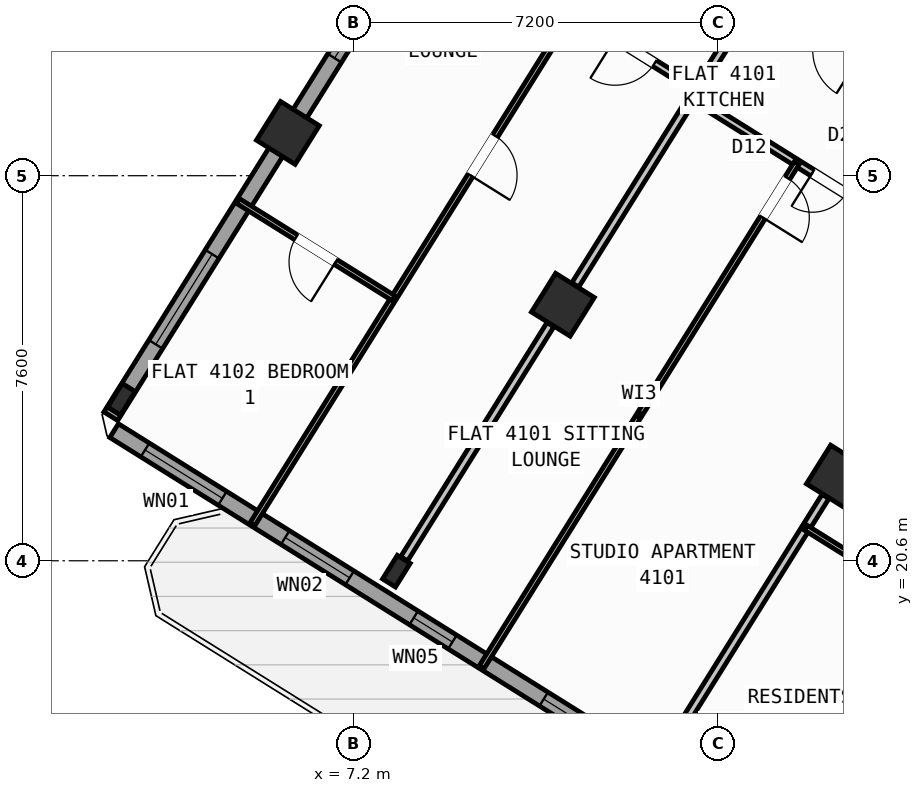
"""IFC4 building model, lengths in metres.
Left out: names, types, materials, properties, quantities, classifications, styles, units other than length and angle.
Written with IfcOpenShell. Run it as: python <this file> out.ifc"""

import sys

from ifc_helpers import new_model, si_unit, direction, frame, frame_2d, origin, origin_2d, place, context, subcontext, project, spatial, rectangle, hollow_rectangle, i_section, extrude, source, transform, mapped, element, fill, save


model = new_model("IFC4")
c1 = context("Model", 3, precision=1e-05, world=origin(), true_north=direction((0.0, 1.0)))
c2 = subcontext(c1, "Body", "Model", "MODEL_VIEW")
j1 = project(units=[si_unit("LENGTHUNIT", "METRE"), si_unit("PLANEANGLEUNIT", "RADIAN")], contexts=[c1])
p1 = place(None, origin())
s1 = spatial("IfcSite", under=j1, at=p1, CompositionType="ELEMENT")
p2 = place(p1, origin())
s2 = spatial("IfcBuilding", under=s1, at=p2, CompositionType="ELEMENT")
p3 = place(p2, frame((0.0, 0.0, 162.3)))
s3 = spatial("IfcBuildingStorey", under=s2, at=p3, CompositionType="ELEMENT", Elevation=162.3)
m1 = source(origin(), c2, "Body", "SweptSolid", [
    extrude(hollow_rectangle(XDim=0.9, YDim=0.9, WallThickness=0.036, at=origin_2d()), origin(), (0.0, 0.0, 1.0), 3.6),
])
for number, where, z_axis, x_axis in (
    (1, (16.764, 22.261, 0.0), (0.0, 0.0, 1.0), (-0.848, 0.53, 0.0)),
    (2, (11.336, 25.653, 0.0), (0.0, 0.0, 1.0), (-0.848, 0.53, 0.0)),
):
    element("IfcColumn", number, at=place(p3, frame(where, z_axis=z_axis, x_axis=x_axis)), inside=s3, PredefinedType="COLUMN", context=c2, shape_type="MappedRepresentation", body=[
        mapped(m1, transform((0.0, 0.0, 0.0), scale=1.0)),
    ])
m2 = source(origin(), c2, "Body", "SweptSolid", [
    extrude(i_section(OverallWidth=0.3, OverallDepth=0.55, WebThickness=0.015, FlangeThickness=0.029, at=origin_2d()), origin(), (0.0, 0.0, 1.0), 3.6),
])
p4 = place(p3, frame((8.051, 20.395, 0.0), z_axis=(0.0, 0.0, 1.0), x_axis=(-0.848048096156, 0.529919264233, 0.0)))
e3 = element("IfcColumn", 3, at=p4, inside=s3, PredefinedType="COLUMN", context=c2, shape_type="MappedRepresentation", body=[
    mapped(m2, transform((0.0, 0.0, 0.0), scale=1.0)),
])
p5 = place(p3, frame((5.909, 29.044, 0.0), z_axis=(0.0, 0.0, 1.0), x_axis=(-0.848048096156, 0.529919264233, 0.0)))
e4 = element("IfcColumn", 4, at=p5, inside=s3, PredefinedType="COLUMN", context=c2, shape_type="MappedRepresentation", body=[
    mapped(m1, transform((0.0, 0.0, 0.0), scale=1.0)),
])
p6 = place(p3, frame((2.623, 23.786, 0.0), z_axis=(0.0, 0.0, 1.0), x_axis=(-0.848048096156, 0.529919264233, 0.0)))
e5 = element("IfcColumn", 5, at=p6, inside=s3, PredefinedType="COLUMN", context=c2, shape_type="MappedRepresentation", body=[
    mapped(m2, transform((0.0, 0.0, 0.0), scale=1.0)),
])
p7 = place(p3, frame((29.268, 6.429, 0.0), z_axis=(0.0, 0.0, 1.0), x_axis=(-0.848049971435, 0.529916263149, 0.0)))
e6 = element("IfcWall", 6, at=p7, inside=s3, PredefinedType="STANDARD", context=c2, shape_type="SweptSolid", body=[
    extrude(rectangle(XDim=31.588, YDim=0.32, at=frame_2d((15.794, 0.0))), origin(), (0.0, 0.0, 1.0), 3.35),
])
p8 = place(p7, frame((16.362, 0.0, 0.0)))
e7 = element("IfcOpeningElement", 7, at=p8, cuts=e6, PredefinedType="OPENING", context=c2, shape_type="SweptSolid", body=[
    extrude(rectangle(XDim=1.2, YDim=2.15, at=frame_2d((0.6, 1.075))), frame((0.0, 0.17, 0.0), z_axis=(0.0, -1.0, 0.0), x_axis=(1.0, 0.0, 0.0)), (0.0, 0.0, 1.0), 0.34),
])
p9 = place(p7, frame((2.989, 0.0, 0.8)))
e8 = element("IfcOpeningElement", 8, at=p9, cuts=e6, PredefinedType="OPENING", context=c2, shape_type="SweptSolid", body=[
    extrude(rectangle(XDim=2.1, YDim=1.55, at=frame_2d((1.05, 0.775))), frame((0.0, 0.17, 0.0), z_axis=(0.0, -1.0, 0.0), x_axis=(1.0, 0.0, 0.0)), (0.0, 0.0, 1.0), 0.34),
])
p10 = place(p7, frame((8.359, 0.0, 0.8)))
e9 = element("IfcOpeningElement", 9, at=p10, cuts=e6, PredefinedType="OPENING", context=c2, shape_type="SweptSolid", body=[
    extrude(rectangle(XDim=2.1, YDim=1.55, at=frame_2d((1.05, 0.775))), frame((0.0, 0.17, 0.0), z_axis=(0.0, -1.0, 0.0), x_axis=(1.0, 0.0, 0.0)), (0.0, 0.0, 1.0), 0.34),
])
p11 = place(p7, frame((13.284, 0.0, 0.95)))
e10 = element("IfcOpeningElement", 10, at=p11, cuts=e6, PredefinedType="OPENING", context=c2, shape_type="SweptSolid", body=[
    extrude(rectangle(XDim=1.2, YDim=1.4, at=frame_2d((0.6, 0.7))), frame((0.0, 0.17, 0.0), z_axis=(0.0, -1.0, 0.0), x_axis=(1.0, 0.0, 0.0)), (0.0, 0.0, 1.0), 0.34),
])
p12 = place(p7, frame((20.39, 0.0, 0.95)))
e11 = element("IfcOpeningElement", 11, at=p12, cuts=e6, PredefinedType="OPENING", context=c2, shape_type="SweptSolid", body=[
    extrude(rectangle(XDim=1.2, YDim=1.4, at=frame_2d((0.6, 0.7))), frame((0.0, 0.17, 0.0), z_axis=(0.0, -1.0, 0.0), x_axis=(1.0, 0.0, 0.0)), (0.0, 0.0, 1.0), 0.34),
])
p13 = place(p7, frame((23.715, 0.0, 1.0)))
e12 = element("IfcOpeningElement", 12, at=p13, cuts=e6, PredefinedType="OPENING", context=c2, shape_type="SweptSolid", body=[
    extrude(rectangle(XDim=0.9, YDim=1.25, at=frame_2d((0.45, 0.625))), frame((0.0, 0.17, 0.0), z_axis=(0.0, -1.0, 0.0), x_axis=(1.0, 0.0, 0.0)), (0.0, 0.0, 1.0), 0.34),
])
p14 = place(p7, frame((26.106, 0.0, 0.85)))
e13 = element("IfcOpeningElement", 13, at=p14, cuts=e6, PredefinedType="OPENING", context=c2, shape_type="SweptSolid", body=[
    extrude(rectangle(XDim=1.5, YDim=1.5, at=frame_2d((0.75, 0.75))), frame((0.0, 0.17, 0.0), z_axis=(0.0, -1.0, 0.0), x_axis=(1.0, 0.0, 0.0)), (0.0, 0.0, 1.0), 0.34),
])
p15 = place(p7, frame((29.068, 0.0, 0.85)))
e14 = element("IfcOpeningElement", 14, at=p15, cuts=e6, PredefinedType="OPENING", context=c2, shape_type="SweptSolid", body=[
    extrude(rectangle(XDim=1.8, YDim=1.5, at=frame_2d((0.9, 0.75))), frame((0.0, 0.17, 0.0), z_axis=(0.0, -1.0, 0.0), x_axis=(1.0, 0.0, 0.0)), (0.0, 0.0, 1.0), 0.34),
])
p16 = place(p3, frame((2.415, 23.452, 0.0), z_axis=(0.0, 0.0, 1.0), x_axis=(0.52991049553, 0.848053575387, 0.0)))
e15 = element("IfcWall", 15, at=p16, inside=s3, PredefinedType="STANDARD", context=c2, shape_type="SweptSolid", body=[
    extrude(rectangle(XDim=21.587, YDim=0.32, at=frame_2d((10.794, 0.0))), origin(), (0.0, 0.0, 1.0), 2.775),
])
p17 = place(p16, frame((1.673, 0.0, 0.8)))
e16 = element("IfcOpeningElement", 16, at=p17, cuts=e15, PredefinedType="OPENING", context=c2, shape_type="SweptSolid", body=[
    extrude(rectangle(XDim=2.1, YDim=1.55, at=frame_2d((1.05, 0.775))), frame((0.0, 0.17, 0.0), z_axis=(0.0, -1.0, 0.0), x_axis=(1.0, 0.0, 0.0)), (0.0, 0.0, 1.0), 0.34),
])
p18 = place(p16, frame((8.334, 0.0, 0.85)))
e17 = element("IfcOpeningElement", 17, at=p18, cuts=e15, PredefinedType="OPENING", context=c2, shape_type="SweptSolid", body=[
    extrude(rectangle(XDim=1.8, YDim=1.5, at=frame_2d((0.9, 0.75))), frame((0.0, 0.17, 0.0), z_axis=(0.0, -1.0, 0.0), x_axis=(1.0, 0.0, 0.0)), (0.0, 0.0, 1.0), 0.34),
])
p19 = place(p16, frame((17.172, 0.0, 0.85)))
e18 = element("IfcOpeningElement", 18, at=p19, cuts=e15, PredefinedType="OPENING", context=c2, shape_type="SweptSolid", body=[
    extrude(rectangle(XDim=1.5, YDim=1.5, at=frame_2d((0.75, 0.75))), frame((0.0, 0.17, 0.0), z_axis=(0.0, -1.0, 0.0), x_axis=(1.0, 0.0, 0.0)), (0.0, 0.0, 1.0), 0.34),
])
p20 = place(p3, frame((14.138, 41.825, 0.0), z_axis=(0.0, 0.0, 1.0), x_axis=(0.848046498049, -0.529921821731, 0.0)))
e19 = element("IfcWall", 19, at=p20, inside=s3, PredefinedType="STANDARD", context=c2, shape_type="SweptSolid", body=[
    extrude(rectangle(XDim=31.588, YDim=0.32, at=frame_2d((15.794, 0.0))), origin(), (0.0, 0.0, 1.0), 3.35),
])
p21 = place(p20, frame((3.253, 0.0, 0.0)))
e20 = element("IfcOpeningElement", 20, at=p21, cuts=e19, PredefinedType="OPENING", context=c2, shape_type="SweptSolid", body=[
    extrude(rectangle(XDim=1.05, YDim=2.15, at=frame_2d((0.525, 1.075))), frame((0.0, 0.17, 0.0), z_axis=(0.0, -1.0, 0.0), x_axis=(1.0, 0.0, 0.0)), (0.0, 0.0, 1.0), 0.34),
])
p22 = place(p20, frame((0.863, 0.0, 0.85)))
e21 = element("IfcOpeningElement", 21, at=p22, cuts=e19, PredefinedType="OPENING", context=c2, shape_type="SweptSolid", body=[
    extrude(rectangle(XDim=1.8, YDim=1.5, at=frame_2d((0.9, 0.75))), frame((0.0, 0.17, 0.0), z_axis=(0.0, -1.0, 0.0), x_axis=(1.0, 0.0, 0.0)), (0.0, 0.0, 1.0), 0.34),
])
p23 = place(p20, frame((8.494, 0.0, 0.85)))
e22 = element("IfcOpeningElement", 22, at=p23, cuts=e19, PredefinedType="OPENING", context=c2, shape_type="SweptSolid", body=[
    extrude(rectangle(XDim=1.8, YDim=1.5, at=frame_2d((0.9, 0.75))), frame((0.0, 0.17, 0.0), z_axis=(0.0, -1.0, 0.0), x_axis=(1.0, 0.0, 0.0)), (0.0, 0.0, 1.0), 0.34),
])
p24 = place(p20, frame((13.874, 0.0, 0.85)))
e23 = element("IfcOpeningElement", 23, at=p24, cuts=e19, PredefinedType="OPENING", context=c2, shape_type="SweptSolid", body=[
    extrude(rectangle(XDim=1.5, YDim=1.5, at=frame_2d((0.75, 0.75))), frame((0.0, 0.17, 0.0), z_axis=(0.0, -1.0, 0.0), x_axis=(1.0, 0.0, 0.0)), (0.0, 0.0, 1.0), 0.34),
])
p25 = place(p20, frame((17.104, 0.0, 1.0)))
e24 = element("IfcOpeningElement", 24, at=p25, cuts=e19, PredefinedType="OPENING", context=c2, shape_type="SweptSolid", body=[
    extrude(rectangle(XDim=0.9, YDim=1.25, at=frame_2d((0.45, 0.625))), frame((0.0, 0.17, 0.0), z_axis=(0.0, -1.0, 0.0), x_axis=(1.0, 0.0, 0.0)), (0.0, 0.0, 1.0), 0.34),
])
p26 = place(p20, frame((22.144, 0.0, 1.0)))
e25 = element("IfcOpeningElement", 25, at=p26, cuts=e19, PredefinedType="OPENING", context=c2, shape_type="SweptSolid", body=[
    extrude(rectangle(XDim=0.9, YDim=1.25, at=frame_2d((0.45, 0.625))), frame((0.0, 0.17, 0.0), z_axis=(0.0, -1.0, 0.0), x_axis=(1.0, 0.0, 0.0)), (0.0, 0.0, 1.0), 0.34),
])
p27 = place(p20, frame((27.744, 0.0, 1.0)))
e26 = element("IfcOpeningElement", 26, at=p27, cuts=e19, PredefinedType="OPENING", context=c2, shape_type="SweptSolid", body=[
    extrude(rectangle(XDim=0.9, YDim=1.25, at=frame_2d((0.45, 0.625))), frame((0.0, 0.17, 0.0), z_axis=(0.0, -1.0, 0.0), x_axis=(1.0, 0.0, 0.0)), (0.0, 0.0, 1.0), 0.34),
])
p28 = place(p3, frame((23.899, 26.529, 0.0), z_axis=(0.0, 0.0, 1.0), x_axis=(-0.529917716469, -0.848049063305, 0.0)))
e27 = element("IfcWall", 27, at=p28, inside=s3, PredefinedType="PARTITIONING", context=c2, shape_type="SweptSolid", body=[
    extrude(rectangle(XDim=14.05, YDim=0.16, at=frame_2d((7.025, 0.0))), origin(), (0.0, 0.0, 1.0), 3.34),
])
p29 = place(p3, frame((25.065, 28.394, 0.0), z_axis=(0.0, 0.0, 1.0), x_axis=(-0.848048310262, 0.529918921593, 0.0)))
e28 = element("IfcWall", 28, at=p29, inside=s3, PredefinedType="PARTITIONING", context=c2, shape_type="SweptSolid", body=[
    extrude(rectangle(XDim=16.73, YDim=0.16, at=frame_2d((8.365, 0.0))), origin(), (0.0, 0.0, 1.0), 3.34),
])
p30 = place(p29, frame((2.22, 0.0, 0.0)))
e29 = element("IfcOpeningElement", 29, at=p30, cuts=e28, PredefinedType="OPENING", context=c2, shape_type="SweptSolid", body=[
    extrude(rectangle(XDim=0.86, YDim=2.05, at=frame_2d((0.43, 1.025))), frame((0.0, 0.09, 0.0), z_axis=(0.0, -1.0, 0.0), x_axis=(1.0, 0.0, 0.0)), (0.0, 0.0, 1.0), 0.18),
])
p31 = place(p29, frame((7.82, 0.0, 0.0)))
e30 = element("IfcOpeningElement", 30, at=p31, cuts=e28, PredefinedType="OPENING", context=c2, shape_type="SweptSolid", body=[
    extrude(rectangle(XDim=1.0, YDim=2.1, at=frame_2d((0.5, 1.05))), frame((0.0, 0.09, 0.0), z_axis=(0.0, -1.0, 0.0), x_axis=(1.0, 0.0, 0.0)), (0.0, 0.0, 1.0), 0.18),
])
p32 = place(p29, frame((12.95, 0.0, 0.0)))
e31 = element("IfcOpeningElement", 31, at=p32, cuts=e28, PredefinedType="OPENING", context=c2, shape_type="SweptSolid", body=[
    extrude(rectangle(XDim=1.0, YDim=2.1, at=frame_2d((0.5, 1.05))), frame((0.0, 0.09, 0.0), z_axis=(0.0, -1.0, 0.0), x_axis=(1.0, 0.0, 0.0)), (0.0, 0.0, 1.0), 0.18),
])
p33 = place(p3, frame((20.293, 28.782, 0.0), z_axis=(0.0, 0.0, 1.0), x_axis=(-0.848040881926, 0.529930809241, 0.0)))
e32 = element("IfcWall", 32, at=p33, inside=s3, PredefinedType="PARTITIONING", context=c2, shape_type="SweptSolid", body=[
    extrude(rectangle(XDim=5.476, YDim=0.16, at=frame_2d((2.738, 0.0))), origin(), (0.0, 0.0, 1.0), 2.775),
])
p34 = place(p33, frame((3.568, 0.0, 0.0)))
e33 = element("IfcOpeningElement", 33, at=p34, cuts=e32, PredefinedType="OPENING", context=c2, shape_type="SweptSolid", body=[
    extrude(rectangle(XDim=1.0, YDim=2.1, at=frame_2d((0.5, 1.05))), frame((0.0, 0.09, 0.0), z_axis=(0.0, -1.0, 0.0), x_axis=(1.0, 0.0, 0.0)), (0.0, 0.0, 1.0), 0.18),
])
p35 = place(p3, frame((16.519, 21.87, 0.0), z_axis=(0.0, 0.0, 1.0), x_axis=(-0.529922447305, -0.848046107144, 0.0)))
e34 = element("IfcWall", 34, at=p35, inside=s3, PredefinedType="PARTITIONING", context=c2, shape_type="SweptSolid", body=[
    extrude(rectangle(XDim=5.451, YDim=0.16, at=frame_2d((2.726, 0.0))), origin(), (0.0, 0.0, 1.0), 2.775),
])
p36 = place(p3, frame((19.346, 19.242, 0.0), z_axis=(0.0, 0.0, 1.0), x_axis=(-0.848059820872, 0.529900500304, 0.0)))
e35 = element("IfcWall", 35, at=p36, inside=s3, PredefinedType="PARTITIONING", context=c2, shape_type="SweptSolid", body=[
    extrude(rectangle(XDim=3.79, YDim=0.11, at=frame_2d((1.895, 0.0))), origin(), (0.0, 0.0, 1.0), 3.34),
])
p37 = place(p36, frame((1.435, 0.0, 0.0)))
e36 = element("IfcOpeningElement", 36, at=p37, cuts=e35, PredefinedType="OPENING", context=c2, shape_type="SweptSolid", body=[
    extrude(rectangle(XDim=0.92, YDim=2.08, at=frame_2d((0.46, 1.04))), frame((0.0, 0.065, 0.0), z_axis=(0.0, -1.0, 0.0), x_axis=(1.0, 0.0, 0.0)), (0.0, 0.0, 1.0), 0.13),
])
p38 = place(p3, frame((14.96, 31.452, 0.0), z_axis=(0.0, 0.0, 1.0), x_axis=(-0.529947310719, -0.848030570122, 0.0)))
e37 = element("IfcWall", 37, at=p38, inside=s3, PredefinedType="PARTITIONING", context=c2, shape_type="SweptSolid", body=[
    extrude(rectangle(XDim=6.376, YDim=0.16, at=frame_2d((3.188, 0.0))), origin(), (0.0, 0.0, 1.0), 2.775),
])
p39 = place(p3, frame((11.091, 25.261, 0.0), z_axis=(0.0, 0.0, 1.0), x_axis=(-0.52994257524, -0.848033529377, 0.0)))
e38 = element("IfcWall", 38, at=p39, inside=s3, PredefinedType="PARTITIONING", context=c2, shape_type="SweptSolid", body=[
    extrude(rectangle(XDim=5.451, YDim=0.16, at=frame_2d((2.726, 0.0))), origin(), (0.0, 0.0, 1.0), 2.775),
])
p40 = place(p3, frame((19.318, 26.349, 0.0), z_axis=(0.0, 0.0, 1.0), x_axis=(-0.848039019877, 0.529933789039, 0.0)))
e39 = element("IfcWall", 39, at=p40, inside=s3, PredefinedType="PLUMBINGWALL", context=c2, shape_type="SweptSolid", body=[
    extrude(rectangle(XDim=6.4, YDim=0.14, at=frame_2d((3.2, 0.0))), origin(), (0.0, 0.0, 1.0), 3.34),
])
p41 = place(p40, frame((2.824, 0.0, 0.0)))
e40 = element("IfcOpeningElement", 40, at=p41, cuts=e39, PredefinedType="OPENING", context=c2, shape_type="SweptSolid", body=[
    extrude(rectangle(XDim=0.78, YDim=2.05, at=frame_2d((0.39, 1.025))), frame((0.0, 0.08, 0.0), z_axis=(0.0, -1.0, 0.0), x_axis=(1.0, 0.0, 0.0)), (0.0, 0.0, 1.0), 0.16),
])
p42 = place(p3, frame((15.953, 28.452, 0.0), z_axis=(0.0, 0.0, 1.0), x_axis=(-0.529931645041, -0.848040359643, 0.0)))
e41 = element("IfcWall", 41, at=p42, inside=s3, PredefinedType="PARTITIONING", context=c2, shape_type="SweptSolid", body=[
    extrude(rectangle(XDim=11.74, YDim=0.11, at=frame_2d((5.87, 0.0))), origin(), (0.0, 0.0, 1.0), 3.34),
])
p43 = place(p42, frame((0.35, 0.0, 0.0)))
e42 = element("IfcOpeningElement", 42, at=p43, cuts=e41, PredefinedType="OPENING", context=c2, shape_type="SweptSolid", body=[
    extrude(rectangle(XDim=0.92, YDim=2.08, at=frame_2d((0.46, 1.04))), frame((0.0, 0.065, 0.0), z_axis=(0.0, -1.0, 0.0), x_axis=(1.0, 0.0, 0.0)), (0.0, 0.0, 1.0), 0.13),
])
p44 = place(p3, frame((12.798, 33.465, 0.0), z_axis=(0.0, 0.0, 1.0), x_axis=(-0.529916182913, -0.848050021571, 0.0)))
e43 = element("IfcWall", 43, at=p44, inside=s3, PredefinedType="PARTITIONING", context=c2, shape_type="SweptSolid", body=[
    extrude(rectangle(XDim=14.32, YDim=0.11, at=frame_2d((7.16, 0.0))), origin(), (0.0, 0.0, 1.0), 3.34),
])
p45 = place(p44, frame((0.76, 0.0, 0.0)))
e44 = element("IfcOpeningElement", 44, at=p45, cuts=e43, PredefinedType="OPENING", context=c2, shape_type="SweptSolid", body=[
    extrude(rectangle(XDim=0.78, YDim=2.05, at=frame_2d((0.39, 1.025))), frame((0.0, 0.065, 0.0), z_axis=(0.0, -1.0, 0.0), x_axis=(1.0, 0.0, 0.0)), (0.0, 0.0, 1.0), 0.13),
])
p46 = place(p44, frame((5.281, 0.0, 0.0)))
e45 = element("IfcOpeningElement", 45, at=p46, cuts=e43, PredefinedType="OPENING", context=c2, shape_type="SweptSolid", body=[
    extrude(rectangle(XDim=0.92, YDim=2.08, at=frame_2d((0.46, 1.04))), frame((0.0, 0.065, 0.0), z_axis=(0.0, -1.0, 0.0), x_axis=(1.0, 0.0, 0.0)), (0.0, 0.0, 1.0), 0.13),
])
p47 = place(p3, frame((13.986, 29.893, 0.0), z_axis=(0.0, 0.0, 1.0), x_axis=(-0.84802195137, 0.529961102341, 0.0)))
e46 = element("IfcWall", 46, at=p47, inside=s3, PredefinedType="PLUMBINGWALL", context=c2, shape_type="SweptSolid", body=[
    extrude(rectangle(XDim=2.9, YDim=0.14, at=frame_2d((1.45, 0.0))), origin(), (0.0, 0.0, 1.0), 3.34),
])
p48 = place(p47, frame((0.99, 0.0, 0.0)))
e47 = element("IfcOpeningElement", 47, at=p48, cuts=e46, PredefinedType="OPENING", context=c2, shape_type="SweptSolid", body=[
    extrude(rectangle(XDim=0.92, YDim=2.08, at=frame_2d((0.46, 1.04))), frame((0.0, 0.08, 0.0), z_axis=(0.0, -1.0, 0.0), x_axis=(1.0, 0.0, 0.0)), (0.0, 0.0, 1.0), 0.16),
])
p49 = place(p3, frame((7.997, 25.781, 0.0), z_axis=(0.0, 0.0, 1.0), x_axis=(-0.848051346257, 0.52991406295, 0.0)))
e48 = element("IfcWall", 48, at=p49, inside=s3, PredefinedType="PARTITIONING", context=c2, shape_type="SweptSolid", body=[
    extrude(rectangle(XDim=3.62, YDim=0.11, at=frame_2d((1.81, 0.0))), origin(), (0.0, 0.0, 1.0), 3.34),
])
p50 = place(p49, frame((1.35, 0.0, 0.0)))
e49 = element("IfcOpeningElement", 49, at=p50, cuts=e48, PredefinedType="OPENING", context=c2, shape_type="SweptSolid", body=[
    extrude(rectangle(XDim=0.92, YDim=2.08, at=frame_2d((0.46, 1.04))), frame((0.0, 0.065, 0.0), z_axis=(0.0, -1.0, 0.0), x_axis=(1.0, 0.0, 0.0)), (0.0, 0.0, 1.0), 0.13),
])
m3 = source(origin(), c2, "Body", "SweptSolid", [
    extrude(rectangle(XDim=1.2, YDim=1.4, at=frame_2d((0.6, 0.7))), frame((0.0, 0.03, 0.0), z_axis=(0.0, -1.0, 0.0), x_axis=(1.0, 0.0, 0.0)), (0.0, 0.0, 1.0), 0.06),
])
p51 = place(p12, origin())
e50 = element("IfcWindow", 50, at=p51, inside=s3, PartitioningType="SINGLE_PANEL", PredefinedType="WINDOW", context=c2, shape_type="MappedRepresentation", body=[
    mapped(m3, transform((0.0, 0.0, 0.0), scale=1.0)),
])
fill(e11, e50)
m4 = source(origin(), c2, "Body", "SweptSolid", [
    extrude(rectangle(XDim=0.9, YDim=1.25, at=frame_2d((0.45, 0.625))), frame((0.0, 0.03, 0.0), z_axis=(0.0, -1.0, 0.0), x_axis=(1.0, 0.0, 0.0)), (0.0, 0.0, 1.0), 0.06),
])
p52 = place(p13, origin())
e51 = element("IfcWindow", 51, at=p52, inside=s3, PartitioningType="SINGLE_PANEL", PredefinedType="WINDOW", context=c2, shape_type="MappedRepresentation", body=[
    mapped(m4, transform((0.0, 0.0, 0.0), scale=1.0)),
])
fill(e12, e51)
m5 = source(origin(), c2, "Body", "SweptSolid", [
    extrude(rectangle(XDim=1.5, YDim=1.5, at=frame_2d((0.75, 0.75))), frame((0.0, 0.03, 0.0), z_axis=(0.0, -1.0, 0.0), x_axis=(1.0, 0.0, 0.0)), (0.0, 0.0, 1.0), 0.06),
])
p53 = place(p14, origin())
e52 = element("IfcWindow", 52, at=p53, inside=s3, PartitioningType="SINGLE_PANEL", PredefinedType="WINDOW", context=c2, shape_type="MappedRepresentation", body=[
    mapped(m5, transform((0.0, 0.0, 0.0), scale=1.0)),
])
fill(e13, e52)
m6 = source(origin(), c2, "Body", "SweptSolid", [
    extrude(rectangle(XDim=1.8, YDim=1.5, at=frame_2d((0.9, 0.75))), frame((0.0, 0.03, 0.0), z_axis=(0.0, -1.0, 0.0), x_axis=(1.0, 0.0, 0.0)), (0.0, 0.0, 1.0), 0.06),
])
p54 = place(p15, origin())
e53 = element("IfcWindow", 53, at=p54, inside=s3, PartitioningType="SINGLE_PANEL", PredefinedType="WINDOW", context=c2, shape_type="MappedRepresentation", body=[
    mapped(m6, transform((0.0, 0.0, 0.0), scale=1.0)),
])
fill(e14, e53)
m7 = source(origin(), c2, "Body", "SweptSolid", [
    extrude(rectangle(XDim=2.1, YDim=1.55, at=frame_2d((1.05, 0.775))), frame((0.0, 0.03, 0.0), z_axis=(0.0, -1.0, 0.0), x_axis=(1.0, 0.0, 0.0)), (0.0, 0.0, 1.0), 0.06),
])
p55 = place(p17, origin())
e54 = element("IfcWindow", 54, at=p55, inside=s3, PartitioningType="SINGLE_PANEL", PredefinedType="WINDOW", context=c2, shape_type="MappedRepresentation", body=[
    mapped(m7, transform((0.0, 0.0, 0.0), scale=1.0)),
])
fill(e16, e54)
p56 = place(p18, origin())
e55 = element("IfcWindow", 55, at=p56, inside=s3, PartitioningType="SINGLE_PANEL", PredefinedType="WINDOW", context=c2, shape_type="MappedRepresentation", body=[
    mapped(m6, transform((0.0, 0.0, 0.0), scale=1.0)),
])
fill(e17, e55)
m8 = source(origin(), c2, "Body", "SweptSolid", [
    extrude(rectangle(XDim=0.92, YDim=2.08, at=frame_2d((0.46, 1.04))), frame((0.0, 0.025, 0.0), z_axis=(0.0, -1.0, 0.0), x_axis=(1.0, 0.0, 0.0)), (0.0, 0.0, 1.0), 0.05),
])
p57 = place(p43, origin())
e56 = element("IfcDoor", 56, at=p57, inside=s3, OperationType="SINGLE_SWING_RIGHT", PredefinedType="DOOR", context=c2, shape_type="MappedRepresentation", body=[
    mapped(m8, transform((0.0, 0.0, 0.0), scale=1.0)),
])
fill(e42, e56)
m9 = source(origin(), c2, "Body", "SweptSolid", [
    extrude(rectangle(XDim=0.78, YDim=2.05, at=frame_2d((0.39, 1.025))), frame((0.0, 0.025, 0.0), z_axis=(0.0, -1.0, 0.0), x_axis=(1.0, 0.0, 0.0)), (0.0, 0.0, 1.0), 0.05),
])
p58 = place(p41, origin())
e57 = element("IfcDoor", 57, at=p58, inside=s3, OperationType="SINGLE_SWING_RIGHT", PredefinedType="DOOR", context=c2, shape_type="MappedRepresentation", body=[
    mapped(m9, transform((0.0, 0.0, 0.0), scale=1.0)),
])
fill(e40, e57)
p59 = place(p48, origin())
e58 = element("IfcDoor", 58, at=p59, inside=s3, OperationType="SINGLE_SWING_RIGHT", PredefinedType="DOOR", context=c2, shape_type="MappedRepresentation", body=[
    mapped(m8, transform((0.0, 0.0, 0.0), scale=1.0)),
])
fill(e47, e58)
p60 = place(p46, origin())
e59 = element("IfcDoor", 59, at=p60, inside=s3, OperationType="SINGLE_SWING_RIGHT", PredefinedType="DOOR", context=c2, shape_type="MappedRepresentation", body=[
    mapped(m8, transform((0.0, 0.0, 0.0), scale=1.0)),
])
fill(e45, e59)
p61 = place(p50, origin())
e60 = element("IfcDoor", 60, at=p61, inside=s3, OperationType="SINGLE_SWING_LEFT", PredefinedType="DOOR", context=c2, shape_type="MappedRepresentation", body=[
    mapped(m8, transform((0.0, 0.0, 0.0), scale=1.0)),
])
fill(e49, e60)
save(model, sys.argv[1])
